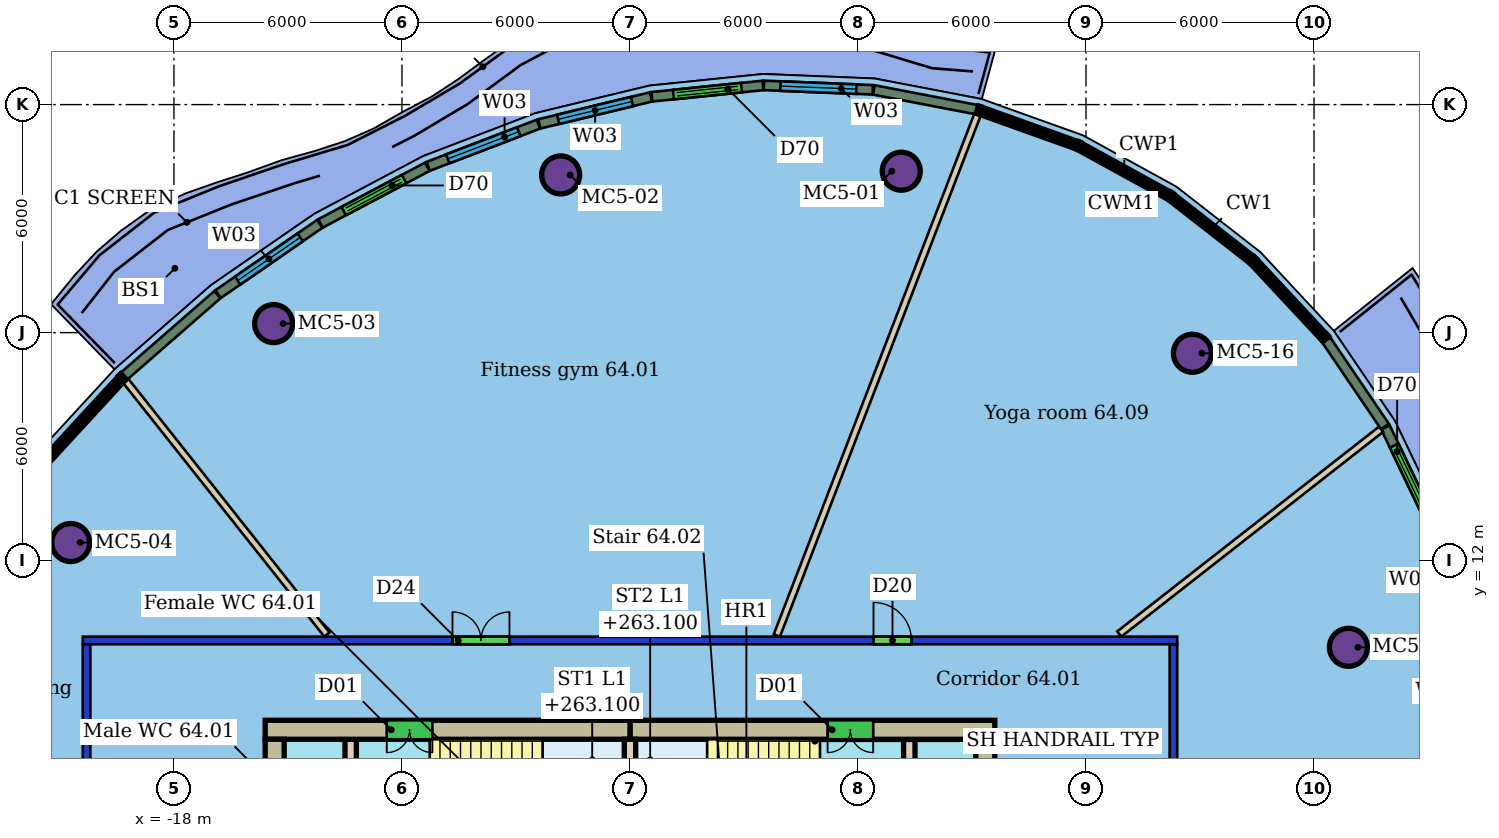
"""IFC4 building model, lengths in metres.
Left out: names, types, materials, properties, quantities, classifications, styles, units other than length and angle.
Written with IfcOpenShell. Run it as: python <this file> out.ifc"""

import sys

from ifc_helpers import new_model, si_unit, direction, frame, frame_2d, origin, origin_2d, place, context, subcontext, project, spatial, rectangle, hollow_circle, extrude, element, fill, save


model = new_model("IFC4")
c1 = context("Model", 3, precision=1e-05, world=origin(), true_north=direction((0.0, 1.0)))
c2 = subcontext(c1, "Body", "Model", "MODEL_VIEW")
j1 = project(units=[si_unit("LENGTHUNIT", "METRE"), si_unit("PLANEANGLEUNIT", "RADIAN")], contexts=[c1])
p1 = place(None, origin())
s1 = spatial("IfcSite", under=j1, at=p1, CompositionType="ELEMENT")
p2 = place(p1, origin())
s2 = spatial("IfcBuilding", under=s1, at=p2, CompositionType="ELEMENT")
p3 = place(p2, frame((0.0, 0.0, 261.3)))
s3 = spatial("IfcBuildingStorey", under=s2, at=p3, CompositionType="ELEMENT", Elevation=261.3)
for number, where, z_axis, x_axis in (
    (1, (1.138, 22.247, 0.0), (0.0, 0.0, 1.0), (1.0, 0.0, 0.0)),
    (2, (-7.825, 22.149, 0.0), (0.0, 0.0, 1.0), (1.0, 0.0, 0.0)),
    (3, (-15.377, 18.238, 0.0), (0.0, 0.0, 1.0), (1.0, 0.0, 0.0)),
    (4, (-20.718, 12.477, 0.0), (0.0, 0.0, 1.0), (1.0, 0.0, 0.0)),
    (5, (12.906, 9.72, 0.0), (0.0, 0.0, 1.0), (1.0, 0.0, 0.0)),
    (6, (8.8, 17.457, 0.0), (0.0, 0.0, 1.0), (1.0, 0.0, 0.0)),
):
    element("IfcColumn", number, at=place(p3, frame(where, z_axis=z_axis, x_axis=x_axis)), inside=s3, PredefinedType="COLUMN", context=c2, shape_type="SweptSolid", body=[
        extrude(hollow_circle(Radius=0.5, WallThickness=0.04, at=origin_2d()), origin(), (0.0, 0.0, 1.0), 3.45),
    ])
p4 = place(p3, frame((-20.3, -9.8, 0.0), z_axis=(0.0, 0.0, 1.0), x_axis=(0.0, 1.0, 0.0)))
e7 = element("IfcWall", 7, at=p4, inside=s3, PredefinedType="PARTITIONING", context=c2, shape_type="SweptSolid", body=[
    extrude(rectangle(XDim=19.6, YDim=0.2, at=frame_2d((9.8, 0.0))), origin(), (0.0, 0.0, 1.0), 3.1),
])
p5 = place(p4, frame((13.678, 0.0, 0.0)))
e8 = element("IfcOpeningElement", 8, at=p5, cuts=e7, PredefinedType="OPENING", context=c2, shape_type="SweptSolid", body=[
    extrude(rectangle(XDim=1.5, YDim=2.1, at=frame_2d((0.75, 1.05))), frame((0.0, 0.11, 0.0), z_axis=(0.0, -1.0, 0.0), x_axis=(1.0, 0.0, 0.0)), (0.0, 0.0, 1.0), 0.22),
])
p6 = place(p4, frame((6.822, 0.0, 0.0)))
e9 = element("IfcOpeningElement", 9, at=p6, cuts=e7, PredefinedType="OPENING", context=c2, shape_type="SweptSolid", body=[
    extrude(rectangle(XDim=1.8, YDim=2.4, at=frame_2d((0.9, 1.2))), frame((0.0, 0.11, 0.0), z_axis=(0.0, -1.0, 0.0), x_axis=(1.0, 0.0, 0.0)), (0.0, 0.0, 1.0), 0.22),
])
p7 = place(p3, frame((-20.4, 9.9, 0.0), z_axis=(0.0, 0.0, 1.0), x_axis=(1.0, 0.0, 0.0)))
e10 = element("IfcWall", 10, at=p7, inside=s3, PredefinedType="PARTITIONING", context=c2, shape_type="SweptSolid", body=[
    extrude(rectangle(XDim=28.8, YDim=0.2, at=frame_2d((14.4, 0.0))), origin(), (0.0, 0.0, 1.0), 3.1),
])
p8 = place(p7, frame((9.729, 0.0, 0.0)))
e11 = element("IfcOpeningElement", 11, at=p8, cuts=e10, PredefinedType="OPENING", context=c2, shape_type="SweptSolid", body=[
    extrude(rectangle(XDim=1.5, YDim=2.1, at=frame_2d((0.75, 1.05))), frame((0.0, 0.11, 0.0), z_axis=(0.0, -1.0, 0.0), x_axis=(1.0, 0.0, 0.0)), (0.0, 0.0, 1.0), 0.22),
])
p9 = place(p7, frame((20.808, 0.0, 0.0)))
e12 = element("IfcOpeningElement", 12, at=p9, cuts=e10, PredefinedType="OPENING", context=c2, shape_type="SweptSolid", body=[
    extrude(rectangle(XDim=1.0, YDim=2.1, at=frame_2d((0.5, 1.05))), frame((0.0, 0.11, 0.0), z_axis=(0.0, -1.0, 0.0), x_axis=(1.0, 0.0, 0.0)), (0.0, 0.0, 1.0), 0.22),
])
p10 = place(p3, frame((8.3, 9.8, 0.0), z_axis=(0.0, 0.0, 1.0), x_axis=(0.0, -1.0, 0.0)))
e13 = element("IfcWall", 13, at=p10, inside=s3, PredefinedType="PARTITIONING", context=c2, shape_type="SweptSolid", body=[
    extrude(rectangle(XDim=19.6, YDim=0.2, at=frame_2d((9.8, 0.0))), origin(), (0.0, 0.0, 1.0), 3.1),
])
p11 = place(p10, frame((9.889, 0.0, 0.0)))
e14 = element("IfcOpeningElement", 14, at=p11, cuts=e13, PredefinedType="OPENING", context=c2, shape_type="SweptSolid", body=[
    extrude(rectangle(XDim=1.8, YDim=2.1, at=frame_2d((0.9, 1.05))), frame((0.0, 0.11, 0.0), z_axis=(0.0, -1.0, 0.0), x_axis=(1.0, 0.0, 0.0)), (0.0, 0.0, 1.0), 0.22),
])
p12 = place(p3, frame((3.145, 23.736, 0.0), z_axis=(0.0, 0.0, 1.0), x_axis=(-0.359540454633, -0.933129498774, 0.0)))
e15 = element("IfcWall", 15, at=p12, inside=s3, PredefinedType="PARTITIONING", context=c2, shape_type="SweptSolid", body=[
    extrude(rectangle(XDim=14.686, YDim=0.175, at=frame_2d((7.343, 0.0))), origin(), (0.0, 0.0, 1.0), 3.45),
])
p13 = place(p3, frame((-19.269, 16.73, 0.0), z_axis=(0.0, 0.0, 1.0), x_axis=(0.621411694678, -0.783484208978, 0.0)))
e16 = element("IfcWall", 16, at=p13, inside=s3, PredefinedType="PARTITIONING", context=c2, shape_type="SweptSolid", body=[
    extrude(rectangle(XDim=8.52, YDim=0.175, at=frame_2d((4.26, 0.0))), origin(), (0.0, 0.0, 1.0), 3.45),
])
p14 = place(p3, frame((13.765, 15.457, 0.0), z_axis=(0.0, 0.0, 1.0), x_axis=(-0.787708163729, -0.616048576651, 0.0)))
e17 = element("IfcWall", 17, at=p14, inside=s3, PredefinedType="PARTITIONING", context=c2, shape_type="SweptSolid", body=[
    extrude(rectangle(XDim=8.747, YDim=0.175, at=frame_2d((4.374, 0.0))), origin(), (0.0, 0.0, 1.0), 3.45),
])
p15 = place(p3, frame((3.124, 23.866, 0.0), z_axis=(0.0, 0.0, 1.0), x_axis=(-0.982095327887, 0.188384625018, 0.0)))
e18 = element("IfcWall", 18, at=p15, inside=s3, PredefinedType="SOLIDWALL", context=c2, shape_type="SweptSolid", body=[
    extrude(rectangle(XDim=2.759, YDim=0.25, at=frame_2d((1.379, 0.0))), origin(), (0.0, 0.0, 1.0), 3.15),
])
p16 = place(p3, frame((0.388, 24.389, 0.0), z_axis=(0.0, 0.0, 1.0), x_axis=(-0.999183295278, 0.040407207744, 0.0)))
e19 = element("IfcWall", 19, at=p16, inside=s3, PredefinedType="SOLIDWALL", context=c2, shape_type="SweptSolid", body=[
    extrude(rectangle(XDim=2.864, YDim=0.25, at=frame_2d((1.432, 0.0))), origin(), (0.0, 0.0, 1.0), 3.15),
])
p17 = place(p16, frame((0.432, 0.0, 0.9)))
e20 = element("IfcOpeningElement", 20, at=p17, cuts=e19, PredefinedType="OPENING", context=c2, shape_type="SweptSolid", body=[
    extrude(rectangle(XDim=2.0, YDim=2.1, at=frame_2d((1.0, 1.05))), frame((0.0, 0.135, 0.0), z_axis=(0.0, -1.0, 0.0), x_axis=(1.0, 0.0, 0.0)), (0.0, 0.0, 1.0), 0.27),
])
p18 = place(p3, frame((-2.499, 24.504, 0.0), z_axis=(0.0, 0.0, 1.0), x_axis=(-0.99482112725, -0.101641156908, 0.0)))
e21 = element("IfcWall", 21, at=p18, inside=s3, PredefinedType="SOLIDWALL", context=c2, shape_type="SweptSolid", body=[
    extrude(rectangle(XDim=2.94, YDim=0.25, at=frame_2d((1.47, 0.0))), origin(), (0.0, 0.0, 1.0), 3.15),
])
p19 = place(p18, frame((0.57, 0.0, 0.0)))
e22 = element("IfcOpeningElement", 22, at=p19, cuts=e21, PredefinedType="OPENING", context=c2, shape_type="SweptSolid", body=[
    extrude(rectangle(XDim=1.8, YDim=2.4, at=frame_2d((0.9, 1.2))), frame((0.0, 0.135, 0.0), z_axis=(0.0, -1.0, 0.0), x_axis=(1.0, 0.0, 0.0)), (0.0, 0.0, 1.0), 0.27),
])
p20 = place(p3, frame((-5.448, 24.201, 0.0), z_axis=(0.0, 0.0, 1.0), x_axis=(-0.972022459513, -0.234887926896, 0.0)))
e23 = element("IfcWall", 23, at=p20, inside=s3, PredefinedType="SOLIDWALL", context=c2, shape_type="SweptSolid", body=[
    extrude(rectangle(XDim=3.022, YDim=0.25, at=frame_2d((1.511, 0.0))), origin(), (0.0, 0.0, 1.0), 3.15),
])
p21 = place(p20, frame((0.511, 0.0, 0.9)))
e24 = element("IfcOpeningElement", 24, at=p21, cuts=e23, PredefinedType="OPENING", context=c2, shape_type="SweptSolid", body=[
    extrude(rectangle(XDim=2.0, YDim=2.1, at=frame_2d((1.0, 1.05))), frame((0.0, 0.135, 0.0), z_axis=(0.0, -1.0, 0.0), x_axis=(1.0, 0.0, 0.0)), (0.0, 0.0, 1.0), 0.27),
])
p22 = place(p3, frame((-8.409, 23.484, 0.0), z_axis=(0.0, 0.0, 1.0), x_axis=(-0.93395615703, -0.357387600156, 0.0)))
e25 = element("IfcWall", 25, at=p22, inside=s3, PredefinedType="SOLIDWALL", context=c2, shape_type="SweptSolid", body=[
    extrude(rectangle(XDim=3.105, YDim=0.25, at=frame_2d((1.553, 0.0))), origin(), (0.0, 0.0, 1.0), 3.15),
])
p23 = place(p22, frame((0.553, 0.0, 0.9)))
e26 = element("IfcOpeningElement", 26, at=p23, cuts=e25, PredefinedType="OPENING", context=c2, shape_type="SweptSolid", body=[
    extrude(rectangle(XDim=2.0, YDim=2.1, at=frame_2d((1.0, 1.05))), frame((0.0, 0.135, 0.0), z_axis=(0.0, -1.0, 0.0), x_axis=(1.0, 0.0, 0.0)), (0.0, 0.0, 1.0), 0.27),
])
p24 = place(p3, frame((-11.331, 22.365, 0.0), z_axis=(0.0, 0.0, 1.0), x_axis=(-0.883433244898, -0.468557042216, 0.0)))
e27 = element("IfcWall", 27, at=p24, inside=s3, PredefinedType="SOLIDWALL", context=c2, shape_type="SweptSolid", body=[
    extrude(rectangle(XDim=3.184, YDim=0.25, at=frame_2d((1.592, 0.0))), origin(), (0.0, 0.0, 1.0), 3.15),
])
p25 = place(p24, frame((0.692, 0.0, 0.0)))
e28 = element("IfcOpeningElement", 28, at=p25, cuts=e27, PredefinedType="OPENING", context=c2, shape_type="SweptSolid", body=[
    extrude(rectangle(XDim=1.8, YDim=2.4, at=frame_2d((0.9, 1.2))), frame((0.0, 0.135, 0.0), z_axis=(0.0, -1.0, 0.0), x_axis=(1.0, 0.0, 0.0)), (0.0, 0.0, 1.0), 0.27),
])
p26 = place(p3, frame((-14.163, 20.862, 0.0), z_axis=(0.0, 0.0, 1.0), x_axis=(-0.822813315807, -0.568311751885, 0.0)))
e29 = element("IfcWall", 29, at=p26, inside=s3, PredefinedType="SOLIDWALL", context=c2, shape_type="SweptSolid", body=[
    extrude(rectangle(XDim=3.252, YDim=0.25, at=frame_2d((1.626, 0.0))), origin(), (0.0, 0.0, 1.0), 3.15),
])
p27 = place(p26, frame((0.626, 0.0, 0.9)))
e30 = element("IfcOpeningElement", 30, at=p27, cuts=e29, PredefinedType="OPENING", context=c2, shape_type="SweptSolid", body=[
    extrude(rectangle(XDim=2.0, YDim=2.1, at=frame_2d((1.0, 1.05))), frame((0.0, 0.135, 0.0), z_axis=(0.0, -1.0, 0.0), x_axis=(1.0, 0.0, 0.0)), (0.0, 0.0, 1.0), 0.27),
])
p28 = place(p3, frame((-16.856, 19.0, 0.0), z_axis=(0.0, 0.0, 1.0), x_axis=(-0.753618743279, -0.657311790385, 0.0)))
e31 = element("IfcWall", 31, at=p28, inside=s3, PredefinedType="SOLIDWALL", context=c2, shape_type="SweptSolid", body=[
    extrude(rectangle(XDim=3.263, YDim=0.25, at=frame_2d((1.631, 0.0))), origin(), (0.0, 0.0, 1.0), 3.15),
])
p29 = place(p3, frame((15.116, 12.925, 0.0), z_axis=(0.0, 0.0, 1.0), x_axis=(-0.432043625995, 0.901852707063, 0.0)))
e32 = element("IfcWall", 32, at=p29, inside=s3, PredefinedType="SOLIDWALL", context=c2, shape_type="SweptSolid", body=[
    extrude(rectangle(XDim=2.864, YDim=0.25, at=frame_2d((1.432, 0.0))), origin(), (0.0, 0.0, 1.0), 3.15),
])
p30 = place(p29, frame((0.532, 0.0, 0.0)))
e33 = element("IfcOpeningElement", 33, at=p30, cuts=e32, PredefinedType="OPENING", context=c2, shape_type="SweptSolid", body=[
    extrude(rectangle(XDim=1.8, YDim=2.4, at=frame_2d((0.9, 1.2))), frame((0.0, 0.135, 0.0), z_axis=(0.0, -1.0, 0.0), x_axis=(1.0, 0.0, 0.0)), (0.0, 0.0, 1.0), 0.27),
])
p31 = place(p3, frame((13.866, 15.531, 0.0), z_axis=(0.0, 0.0, 1.0), x_axis=(-0.561217901017, 0.827668090226, 0.0)))
e34 = element("IfcWall", 34, at=p31, inside=s3, PredefinedType="SOLIDWALL", context=c2, shape_type="SweptSolid", body=[
    extrude(rectangle(XDim=2.759, YDim=0.25, at=frame_2d((1.379, 0.0))), origin(), (0.0, 0.0, 1.0), 3.15),
])
p32 = place(p3, frame((3.6, 7.55, 0.0), z_axis=(0.0, 0.0, 1.0), x_axis=(-1.0, 0.0, 0.0)))
e35 = element("IfcWall", 35, at=p32, inside=s3, PredefinedType="SHEAR", context=c2, shape_type="SweptSolid", body=[
    extrude(rectangle(XDim=9.6, YDim=0.5, at=frame_2d((4.8, 0.0))), origin(), (0.0, 0.0, 1.0), 3.3),
])
p33 = place(p32, frame((3.2, 0.0, 0.0)))
e36 = element("IfcOpeningElement", 36, at=p33, cuts=e35, PredefinedType="OPENING", context=c2, shape_type="SweptSolid", body=[
    extrude(rectangle(XDim=1.2, YDim=2.1, at=frame_2d((0.6, 1.05))), frame((0.0, 0.26, 0.0), z_axis=(0.0, -1.0, 0.0), x_axis=(1.0, 0.0, 0.0)), (0.0, 0.0, 1.0), 0.52),
])
p34 = place(p3, frame((-6.0, 7.55, 0.0), z_axis=(0.0, 0.0, 1.0), x_axis=(-1.0, 0.0, 0.0)))
e37 = element("IfcWall", 37, at=p34, inside=s3, PredefinedType="SHEAR", context=c2, shape_type="SweptSolid", body=[
    extrude(rectangle(XDim=9.6, YDim=0.5, at=frame_2d((4.8, 0.0))), origin(), (0.0, 0.0, 1.0), 3.3),
])
p35 = place(p34, frame((5.2, 0.0, 0.0)))
e38 = element("IfcOpeningElement", 38, at=p35, cuts=e37, PredefinedType="OPENING", context=c2, shape_type="SweptSolid", body=[
    extrude(rectangle(XDim=1.2, YDim=2.1, at=frame_2d((0.6, 1.05))), frame((0.0, 0.26, 0.0), z_axis=(0.0, -1.0, 0.0), x_axis=(1.0, 0.0, 0.0)), (0.0, 0.0, 1.0), 0.52),
])
p36 = place(p3, frame((-15.35, 7.3, 0.0), z_axis=(0.0, 0.0, 1.0), x_axis=(0.0, -1.0, 0.0)))
e39 = element("IfcWall", 39, at=p36, inside=s3, PredefinedType="SHEAR", context=c2, shape_type="SweptSolid", body=[
    extrude(rectangle(XDim=14.6, YDim=0.5, at=frame_2d((7.3, 0.0))), origin(), (0.0, 0.0, 1.0), 3.3),
])
p37 = place(p36, frame((10.6, 0.0, 0.0)))
e40 = element("IfcOpeningElement", 40, at=p37, cuts=e39, PredefinedType="OPENING", context=c2, shape_type="SweptSolid", body=[
    extrude(rectangle(XDim=1.2, YDim=2.1, at=frame_2d((0.6, 1.05))), frame((0.0, 0.26, 0.0), z_axis=(0.0, -1.0, 0.0), x_axis=(1.0, 0.0, 0.0)), (0.0, 0.0, 1.0), 0.52),
])
p38 = place(p36, frame((2.8, 0.0, 0.0)))
e41 = element("IfcOpeningElement", 41, at=p38, cuts=e39, PredefinedType="OPENING", context=c2, shape_type="SweptSolid", body=[
    extrude(rectangle(XDim=1.2, YDim=2.1, at=frame_2d((0.6, 1.05))), frame((0.0, 0.26, 0.0), z_axis=(0.0, -1.0, 0.0), x_axis=(1.0, 0.0, 0.0)), (0.0, 0.0, 1.0), 0.52),
])
p39 = place(p3, frame((3.35, -7.3, 0.0), z_axis=(0.0, 0.0, 1.0), x_axis=(0.0, 1.0, 0.0)))
e42 = element("IfcWall", 42, at=p39, inside=s3, PredefinedType="SHEAR", context=c2, shape_type="SweptSolid", body=[
    extrude(rectangle(XDim=14.6, YDim=0.5, at=frame_2d((7.3, 0.0))), origin(), (0.0, 0.0, 1.0), 3.3),
])
p40 = place(p39, frame((2.8, 0.0, 0.0)))
e43 = element("IfcOpeningElement", 43, at=p40, cuts=e42, PredefinedType="OPENING", context=c2, shape_type="SweptSolid", body=[
    extrude(rectangle(XDim=1.2, YDim=2.1, at=frame_2d((0.6, 1.05))), frame((0.0, 0.26, 0.0), z_axis=(0.0, -1.0, 0.0), x_axis=(1.0, 0.0, 0.0)), (0.0, 0.0, 1.0), 0.52),
])
p41 = place(p39, frame((10.6, 0.0, 0.0)))
e44 = element("IfcOpeningElement", 44, at=p41, cuts=e42, PredefinedType="OPENING", context=c2, shape_type="SweptSolid", body=[
    extrude(rectangle(XDim=1.2, YDim=2.1, at=frame_2d((0.6, 1.05))), frame((0.0, 0.26, 0.0), z_axis=(0.0, -1.0, 0.0), x_axis=(1.0, 0.0, 0.0)), (0.0, 0.0, 1.0), 0.52),
])
p42 = place(p3, frame((-13.35, 7.3, 0.0), z_axis=(0.0, 0.0, 1.0), x_axis=(0.0, -1.0, 0.0)))
e45 = element("IfcWall", 45, at=p42, inside=s3, PredefinedType="SHEAR", context=c2, shape_type="SweptSolid", body=[
    extrude(rectangle(XDim=14.6, YDim=0.3, at=frame_2d((7.3, 0.0))), origin(), (0.0, 0.0, 1.0), 3.3),
])
p43 = place(p42, frame((6.55, 0.0, 0.0)))
e46 = element("IfcOpeningElement", 46, at=p43, cuts=e45, PredefinedType="OPENING", context=c2, shape_type="SweptSolid", body=[
    extrude(rectangle(XDim=1.5, YDim=2.1, at=frame_2d((0.75, 1.05))), frame((0.0, 0.16, 0.0), z_axis=(0.0, -1.0, 0.0), x_axis=(1.0, 0.0, 0.0)), (0.0, 0.0, 1.0), 0.32),
])
p44 = place(p3, frame((1.35, -7.3, 0.0), z_axis=(0.0, 0.0, 1.0), x_axis=(0.0, 1.0, 0.0)))
e47 = element("IfcWall", 47, at=p44, inside=s3, PredefinedType="SHEAR", context=c2, shape_type="SweptSolid", body=[
    extrude(rectangle(XDim=14.6, YDim=0.3, at=frame_2d((7.3, 0.0))), origin(), (0.0, 0.0, 1.0), 3.3),
])
p45 = place(p44, frame((1.21, 0.0, 0.0)))
e48 = element("IfcOpeningElement", 48, at=p45, cuts=e47, PredefinedType="OPENING", context=c2, shape_type="SweptSolid", body=[
    extrude(rectangle(XDim=1.0, YDim=2.1, at=frame_2d((0.5, 1.05))), frame((0.0, 0.16, 0.0), z_axis=(0.0, -1.0, 0.0), x_axis=(1.0, 0.0, 0.0)), (0.0, 0.0, 1.0), 0.32),
])
p46 = place(p44, frame((6.55, 0.0, 0.0)))
e49 = element("IfcOpeningElement", 49, at=p46, cuts=e47, PredefinedType="OPENING", context=c2, shape_type="SweptSolid", body=[
    extrude(rectangle(XDim=1.5, YDim=2.1, at=frame_2d((0.75, 1.05))), frame((0.0, 0.16, 0.0), z_axis=(0.0, -1.0, 0.0), x_axis=(1.0, 0.0, 0.0)), (0.0, 0.0, 1.0), 0.32),
])
p47 = place(p3, frame((-6.0, 3.88, 0.0), z_axis=(0.0, 0.0, 1.0), x_axis=(0.0, 1.0, 0.0)))
e50 = element("IfcWall", 50, at=p47, inside=s3, PredefinedType="SHEAR", context=c2, shape_type="SweptSolid", body=[
    extrude(rectangle(XDim=3.42, YDim=0.3, at=frame_2d((1.71, 0.0))), origin(), (0.0, 0.0, 1.0), 3.3),
])
p48 = place(p8, origin())
e51 = element("IfcDoor", 51, at=p48, inside=s3, OperationType="DOUBLE_DOOR_SINGLE_SWING", PredefinedType="DOOR", context=c2, shape_type="SweptSolid", body=[
    extrude(rectangle(XDim=1.5, YDim=2.1, at=frame_2d((0.75, 1.05))), frame((0.0, 0.025, 0.0), z_axis=(0.0, -1.0, 0.0), x_axis=(1.0, 0.0, 0.0)), (0.0, 0.0, 1.0), 0.05),
])
fill(e11, e51)
p49 = place(p9, origin())
e52 = element("IfcDoor", 52, at=p49, inside=s3, OperationType="SINGLE_SWING_LEFT", PredefinedType="DOOR", context=c2, shape_type="SweptSolid", body=[
    extrude(rectangle(XDim=1.0, YDim=2.1, at=frame_2d((0.5, 1.05))), frame((0.0, 0.025, 0.0), z_axis=(0.0, -1.0, 0.0), x_axis=(1.0, 0.0, 0.0)), (0.0, 0.0, 1.0), 0.05),
])
fill(e12, e52)
p50 = place(p17, origin())
e53 = element("IfcWindow", 53, at=p50, inside=s3, PartitioningType="SINGLE_PANEL", PredefinedType="WINDOW", context=c2, shape_type="SweptSolid", body=[
    extrude(rectangle(XDim=2.0, YDim=2.1, at=frame_2d((1.0, 1.05))), frame((0.0, 0.03, 0.0), z_axis=(0.0, -1.0, 0.0), x_axis=(1.0, 0.0, 0.0)), (0.0, 0.0, 1.0), 0.06),
])
fill(e20, e53)
p51 = place(p19, origin())
e54 = element("IfcDoor", 54, at=p51, inside=s3, OperationType="DOUBLE_DOOR_SLIDING", PredefinedType="DOOR", context=c2, shape_type="SweptSolid", body=[
    extrude(rectangle(XDim=1.8, YDim=2.4, at=frame_2d((0.9, 1.2))), frame((0.0, 0.025, 0.0), z_axis=(0.0, -1.0, 0.0), x_axis=(1.0, 0.0, 0.0)), (0.0, 0.0, 1.0), 0.05),
])
fill(e22, e54)
p52 = place(p21, origin())
e55 = element("IfcWindow", 55, at=p52, inside=s3, PartitioningType="SINGLE_PANEL", PredefinedType="WINDOW", context=c2, shape_type="SweptSolid", body=[
    extrude(rectangle(XDim=2.0, YDim=2.1, at=frame_2d((1.0, 1.05))), frame((0.0, 0.03, 0.0), z_axis=(0.0, -1.0, 0.0), x_axis=(1.0, 0.0, 0.0)), (0.0, 0.0, 1.0), 0.06),
])
fill(e24, e55)
p53 = place(p23, origin())
e56 = element("IfcWindow", 56, at=p53, inside=s3, PartitioningType="SINGLE_PANEL", PredefinedType="WINDOW", context=c2, shape_type="SweptSolid", body=[
    extrude(rectangle(XDim=2.0, YDim=2.1, at=frame_2d((1.0, 1.05))), frame((0.0, 0.03, 0.0), z_axis=(0.0, -1.0, 0.0), x_axis=(1.0, 0.0, 0.0)), (0.0, 0.0, 1.0), 0.06),
])
fill(e26, e56)
p54 = place(p25, origin())
e57 = element("IfcDoor", 57, at=p54, inside=s3, OperationType="DOUBLE_DOOR_SLIDING", PredefinedType="DOOR", context=c2, shape_type="SweptSolid", body=[
    extrude(rectangle(XDim=1.8, YDim=2.4, at=frame_2d((0.9, 1.2))), frame((0.0, 0.025, 0.0), z_axis=(0.0, -1.0, 0.0), x_axis=(1.0, 0.0, 0.0)), (0.0, 0.0, 1.0), 0.05),
])
fill(e28, e57)
p55 = place(p27, origin())
e58 = element("IfcWindow", 58, at=p55, inside=s3, PartitioningType="SINGLE_PANEL", PredefinedType="WINDOW", context=c2, shape_type="SweptSolid", body=[
    extrude(rectangle(XDim=2.0, YDim=2.1, at=frame_2d((1.0, 1.05))), frame((0.0, 0.03, 0.0), z_axis=(0.0, -1.0, 0.0), x_axis=(1.0, 0.0, 0.0)), (0.0, 0.0, 1.0), 0.06),
])
fill(e30, e58)
p56 = place(p30, origin())
e59 = element("IfcDoor", 59, at=p56, inside=s3, OperationType="DOUBLE_DOOR_SLIDING", PredefinedType="DOOR", context=c2, shape_type="SweptSolid", body=[
    extrude(rectangle(XDim=1.8, YDim=2.4, at=frame_2d((0.9, 1.2))), frame((0.0, 0.025, 0.0), z_axis=(0.0, -1.0, 0.0), x_axis=(1.0, 0.0, 0.0)), (0.0, 0.0, 1.0), 0.05),
])
fill(e33, e59)
p57 = place(p33, origin())
e60 = element("IfcDoor", 60, at=p57, inside=s3, OperationType="DOUBLE_DOOR_SINGLE_SWING", PredefinedType="NOTDEFINED", context=c2, shape_type="SweptSolid", body=[
    extrude(rectangle(XDim=1.2, YDim=2.1, at=frame_2d((0.6, 1.05))), frame((0.0, 0.025, 0.0), z_axis=(0.0, -1.0, 0.0), x_axis=(1.0, 0.0, 0.0)), (0.0, 0.0, 1.0), 0.05),
])
fill(e36, e60)
p58 = place(p35, origin())
e61 = element("IfcDoor", 61, at=p58, inside=s3, OperationType="DOUBLE_DOOR_SINGLE_SWING", PredefinedType="NOTDEFINED", context=c2, shape_type="SweptSolid", body=[
    extrude(rectangle(XDim=1.2, YDim=2.1, at=frame_2d((0.6, 1.05))), frame((0.0, 0.025, 0.0), z_axis=(0.0, -1.0, 0.0), x_axis=(1.0, 0.0, 0.0)), (0.0, 0.0, 1.0), 0.05),
])
fill(e38, e61)
save(model, sys.argv[1])
